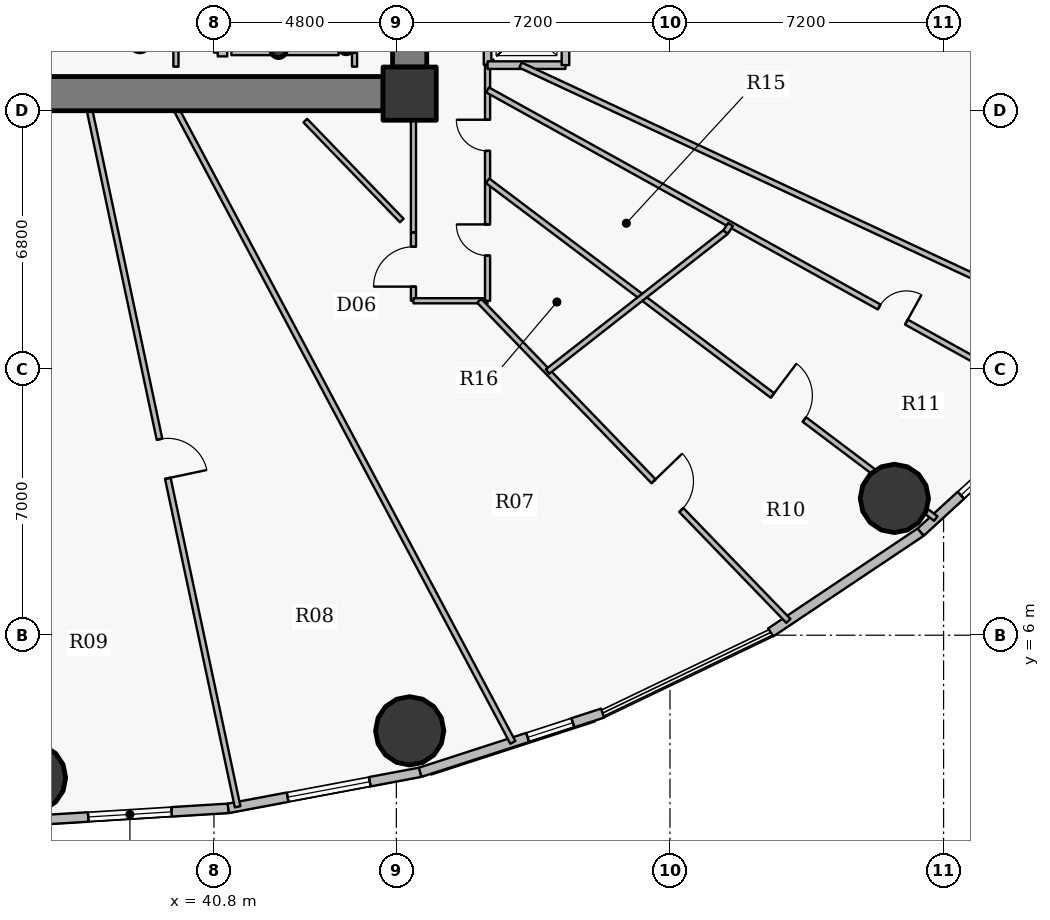
"""IFC4 building model, lengths in metres.
Left out: names, types, materials, properties, quantities, classifications, styles, units other than length and angle.
Written with IfcOpenShell. Run it as: python <this file> out.ifc"""

import sys

from ifc_helpers import new_model, si_unit, direction, frame, frame_2d, origin, origin_2d, place, context, subcontext, project, spatial, rectangle, hollow_circle, extrude, source, transform, mapped, element, fill, save


model = new_model("IFC4")
c1 = context("Model", 3, precision=1e-05, world=origin(), true_north=direction((0.0, 1.0)))
c2 = subcontext(c1, "Body", "Model", "MODEL_VIEW")
j1 = project(units=[si_unit("LENGTHUNIT", "METRE"), si_unit("PLANEANGLEUNIT", "RADIAN")], contexts=[c1])
p1 = place(None, origin())
s1 = spatial("IfcSite", under=j1, at=p1, CompositionType="ELEMENT")
p2 = place(p1, origin())
s2 = spatial("IfcBuilding", under=s1, at=p2, CompositionType="ELEMENT")
p3 = place(p2, frame((0.0, 0.0, 18.6)))
s3 = spatial("IfcBuildingStorey", under=s2, at=p3, CompositionType="ELEMENT", Elevation=18.6)
p4 = place(p3, frame((45.95, 20.25, 0.0), z_axis=(0.0, 0.0, 1.0), x_axis=(1.0, 0.0, 0.0)))
e1 = element("IfcColumn", 1, at=p4, inside=s3, PredefinedType="COLUMN", context=c2, shape_type="SweptSolid", body=[
    extrude(rectangle(XDim=1.4, YDim=1.4, at=origin_2d()), origin(), (0.0, 0.0, 1.0), 4.2),
])
p5 = place(p3, frame((38.85, 21.6, 0.0), z_axis=(0.0, 0.0, 1.0), x_axis=(1.0, 0.0, 0.0)))
e2 = element("IfcColumn", 2, at=p5, inside=s3, PredefinedType="COLUMN", context=c2, shape_type="SweptSolid", body=[
    extrude(hollow_circle(Radius=0.254, WallThickness=0.02, at=origin_2d()), origin(), (0.0, 0.0, 1.0), 4.2),
])
for number, where, z_axis, x_axis in (
    (3, (44.28, 21.5, 0.0), (0.0, 0.0, 1.0), (1.0, 0.0, 0.0)),
    (4, (42.5, 21.4, 0.0), (0.0, 0.0, 1.0), (1.0, 0.0, 0.0)),
):
    element("IfcColumn", number, at=place(p3, frame(where, z_axis=z_axis, x_axis=x_axis)), inside=s3, PredefinedType="COLUMN", context=c2, shape_type="SweptSolid", body=[
        extrude(hollow_circle(Radius=0.203, WallThickness=0.016, at=origin_2d()), origin(), (0.0, 0.0, 1.0), 4.2),
    ])
p6 = place(p3, frame((45.95, 33.05, 0.0), z_axis=(0.0, 0.0, 1.0), x_axis=(0.0, -1.0, 0.0)))
e5 = element("IfcWall", 5, at=p6, inside=s3, PredefinedType="SHEAR", context=c2, shape_type="SweptSolid", body=[
    extrude(rectangle(XDim=12.1, YDim=0.9, at=frame_2d((6.05, 0.0))), origin(), (0.0, 0.0, 1.0), 3.35),
])
p7 = place(p6, frame((5.64, 0.0, 0.0)))
e6 = element("IfcOpeningElement", 6, at=p7, cuts=e5, PredefinedType="OPENING", context=c2, shape_type="SweptSolid", body=[
    extrude(rectangle(XDim=0.82, YDim=2.1, at=origin_2d()), frame((0.41, 0.46, 1.05), z_axis=(0.0, -1.0, 0.0), x_axis=(1.0, 0.0, 0.0)), (0.0, 0.0, 1.0), 0.92),
])
p8 = place(p3, frame((45.25, 20.25, 0.0), z_axis=(0.0, 0.0, 1.0), x_axis=(-1.0, 0.0, 0.0)))
e7 = element("IfcWall", 7, at=p8, inside=s3, PredefinedType="SHEAR", context=c2, shape_type="SweptSolid", body=[
    extrude(rectangle(XDim=18.5, YDim=0.9, at=frame_2d((9.25, 0.0))), origin(), (0.0, 0.0, 1.0), 3.35),
])
p9 = place(p8, frame((10.0, 0.0, 0.0)))
e8 = element("IfcOpeningElement", 8, at=p9, cuts=e7, PredefinedType="OPENING", context=c2, shape_type="SweptSolid", body=[
    extrude(rectangle(XDim=1.15, YDim=2.15, at=origin_2d()), frame((0.575, 0.46, 1.075), z_axis=(0.0, -1.0, 0.0), x_axis=(1.0, 0.0, 0.0)), (0.0, 0.0, 1.0), 0.92),
])
for number, where, z_axis, x_axis in (
    (9, (36.0, 2.25, 0.0), (0.0, 0.0, 1.0), (1.0, 0.0, 0.0)),
    (10, (45.951, 3.484, 0.0), (0.0, 0.0, 1.0), (1.0, 0.0, 0.0)),
    (11, (58.705, 9.599, 0.0), (0.0, 0.0, 1.0), (1.0, 0.0, 0.0)),
):
    element("IfcColumn", number, at=place(p3, frame(where, z_axis=z_axis, x_axis=x_axis)), inside=s3, PredefinedType="COLUMN", context=c2, shape_type="SweptSolid", body=[
        extrude(hollow_circle(Radius=0.9, WallThickness=0.05, at=origin_2d()), origin(), (0.0, 0.0, 1.0), 4.2),
    ])
p10 = place(p3, frame((41.178, 1.444, 0.0), z_axis=(0.0, 0.0, 1.0), x_axis=(-0.998106762298, -0.061505211614, 0.0)))
e12 = element("IfcWall", 12, at=p10, inside=s3, PredefinedType="SOLIDWALL", context=c2, shape_type="SweptSolid", body=[
    extrude(rectangle(XDim=5.188, YDim=0.25, at=frame_2d((2.594, 0.0))), origin(), (0.0, 0.0, 1.0), 3.9),
])
p11 = place(p10, frame((1.494, 0.0, 0.9)))
e13 = element("IfcOpeningElement", 13, at=p11, cuts=e12, PredefinedType="OPENING", context=c2, shape_type="SweptSolid", body=[
    extrude(rectangle(XDim=2.2, YDim=2.0, at=origin_2d()), frame((1.1, 0.135, 1.0), z_axis=(0.0, -1.0, 0.0), x_axis=(1.0, 0.0, 0.0)), (0.0, 0.0, 1.0), 0.27),
])
p12 = place(p3, frame((46.229, 2.394, 0.0), z_axis=(0.0, 0.0, 1.0), x_axis=(-0.98278278947, -0.184764684726, 0.0)))
e14 = element("IfcWall", 14, at=p12, inside=s3, PredefinedType="SOLIDWALL", context=c2, shape_type="SweptSolid", body=[
    extrude(rectangle(XDim=5.139, YDim=0.25, at=frame_2d((2.569, 0.0))), origin(), (0.0, 0.0, 1.0), 3.9),
])
p13 = place(p12, frame((1.351, 0.0, 0.9)))
e15 = element("IfcOpeningElement", 15, at=p13, cuts=e14, PredefinedType="OPENING", context=c2, shape_type="SweptSolid", body=[
    extrude(rectangle(XDim=2.2, YDim=2.0, at=origin_2d()), frame((1.1, 0.135, 1.0), z_axis=(0.0, -1.0, 0.0), x_axis=(1.0, 0.0, 0.0)), (0.0, 0.0, 1.0), 0.27),
])
p14 = place(p3, frame((51.026, 3.95, 0.0), z_axis=(0.0, 0.0, 1.0), x_axis=(-0.951198629726, -0.308579271513, 0.0)))
e16 = element("IfcWall", 16, at=p14, inside=s3, PredefinedType="SOLIDWALL", context=c2, shape_type="SweptSolid", body=[
    extrude(rectangle(XDim=5.044, YDim=0.25, at=frame_2d((2.522, 0.0))), origin(), (0.0, 0.0, 1.0), 3.9),
])
p15 = place(p14, frame((0.822, 0.0, 0.9)))
e17 = element("IfcOpeningElement", 17, at=p15, cuts=e16, PredefinedType="OPENING", context=c2, shape_type="SweptSolid", body=[
    extrude(rectangle(XDim=1.25, YDim=1.65, at=origin_2d()), frame((0.625, 0.135, 0.825), z_axis=(0.0, -1.0, 0.0), x_axis=(1.0, 0.0, 0.0)), (0.0, 0.0, 1.0), 0.27),
])
p16 = place(p3, frame((59.399, 8.714, 0.0), z_axis=(0.0, 0.0, 1.0), x_axis=(-0.831218664812, -0.555945618985, 0.0)))
e18 = element("IfcWall", 18, at=p16, inside=s3, PredefinedType="SOLIDWALL", context=c2, shape_type="SweptSolid", body=[
    extrude(rectangle(XDim=4.748, YDim=0.25, at=frame_2d((2.374, 0.0))), origin(), (0.0, 0.0, 1.0), 3.9),
])
p17 = place(p3, frame((62.768, 11.802, 0.0), z_axis=(0.0, 0.0, 1.0), x_axis=(-0.737076532105, -0.675809282136, 0.0)))
e19 = element("IfcWall", 19, at=p17, inside=s3, PredefinedType="SOLIDWALL", context=c2, shape_type="SweptSolid", body=[
    extrude(rectangle(XDim=4.571, YDim=0.25, at=frame_2d((2.285, 0.0))), origin(), (0.0, 0.0, 1.0), 3.9),
])
p18 = place(p17, frame((0.936, 0.0, 0.9)))
e20 = element("IfcOpeningElement", 20, at=p18, cuts=e19, PredefinedType="OPENING", context=c2, shape_type="SweptSolid", body=[
    extrude(rectangle(XDim=2.2, YDim=2.0, at=origin_2d()), frame((1.1, 0.135, 1.0), z_axis=(0.0, -1.0, 0.0), x_axis=(1.0, 0.0, 0.0)), (0.0, 0.0, 1.0), 0.27),
])
p19 = place(p3, frame((37.531, 19.8, 0.0), z_axis=(0.0, 0.0, 1.0), x_axis=(0.207904603096, -0.978149107249, 0.0)))
e21 = element("IfcWall", 21, at=p19, inside=s3, PredefinedType="PARTITIONING", context=c2, shape_type="SweptSolid", body=[
    extrude(rectangle(XDim=18.724, YDim=0.15, at=frame_2d((9.362, 0.0))), origin(), (0.0, 0.0, 1.0), 3.285),
])
p20 = place(p19, frame((8.837, 0.0, 0.0)))
e22 = element("IfcOpeningElement", 22, at=p20, cuts=e21, PredefinedType="OPENING", context=c2, shape_type="SweptSolid", body=[
    extrude(rectangle(XDim=1.05, YDim=2.15, at=origin_2d()), frame((0.525, 0.085, 1.075), z_axis=(0.0, -1.0, 0.0), x_axis=(1.0, 0.0, 0.0)), (0.0, 0.0, 1.0), 0.17),
])
p21 = place(p3, frame((39.828, 19.8, 0.0), z_axis=(0.0, 0.0, 1.0), x_axis=(0.469463695446, -0.882951775953, 0.0)))
e23 = element("IfcWall", 23, at=p21, inside=s3, PredefinedType="PARTITIONING", context=c2, shape_type="SweptSolid", body=[
    extrude(rectangle(XDim=18.824, YDim=0.15, at=frame_2d((9.412, 0.0))), origin(), (0.0, 0.0, 1.0), 3.285),
])
p22 = place(p3, frame((40.9, 21.33, 0.0), z_axis=(0.0, 0.0, 1.0), x_axis=(0.0, 1.0, 0.0)))
e24 = element("IfcWall", 24, at=p22, inside=s3, PredefinedType="PARTITIONING", context=c2, shape_type="SweptSolid", body=[
    extrude(rectangle(XDim=5.91, YDim=0.2, at=frame_2d((2.955, 0.0))), origin(), (0.0, 0.0, 1.0), 3.435),
])
p23 = place(p3, frame((40.9, 21.33, 0.0), z_axis=(0.0, 0.0, 1.0), x_axis=(1.0, 0.0, 0.0)))
e25 = element("IfcWall", 25, at=p23, inside=s3, PredefinedType="PARTITIONING", context=c2, shape_type="SweptSolid", body=[
    extrude(rectangle(XDim=0.25, YDim=0.2, at=frame_2d((0.125, 0.0))), origin(), (0.0, 0.0, 1.0), 3.435),
])
p24 = place(p3, frame((44.44, 21.33, 0.0), z_axis=(0.0, 0.0, 1.0), x_axis=(0.0, 1.0, 0.0)))
e26 = element("IfcWall", 26, at=p24, inside=s3, PredefinedType="PARTITIONING", context=c2, shape_type="SweptSolid", body=[
    extrude(rectangle(XDim=8.52, YDim=0.2, at=frame_2d((4.26, 0.0))), origin(), (0.0, 0.0, 1.0), 3.9),
])
p25 = place(p3, frame((46.05, 14.8, 0.0), z_axis=(0.0, 0.0, 1.0), x_axis=(0.0, 1.0, 0.0)))
e27 = element("IfcWall", 27, at=p25, inside=s3, PredefinedType="PARTITIONING", context=c2, shape_type="SweptSolid", body=[
    extrude(rectangle(XDim=1.793, YDim=0.135, at=frame_2d((0.896, 0.0))), origin(), (0.0, 0.0, 1.0), 3.9),
])
p26 = place(p25, frame((0.372, 0.0, 0.0)))
e28 = element("IfcOpeningElement", 28, at=p26, cuts=e27, PredefinedType="OPENING", context=c2, shape_type="SweptSolid", body=[
    extrude(rectangle(XDim=1.05, YDim=2.15, at=origin_2d()), frame((0.525, 0.078, 1.075), z_axis=(0.0, -1.0, 0.0), x_axis=(1.0, 0.0, 0.0)), (0.0, 0.0, 1.0), 0.155),
])
p27 = place(p3, frame((46.05, 14.8, 0.0), z_axis=(0.0, 0.0, 1.0), x_axis=(1.0, 0.0, 0.0)))
e29 = element("IfcWall", 29, at=p27, inside=s3, PredefinedType="PARTITIONING", context=c2, shape_type="SweptSolid", body=[
    extrude(rectangle(XDim=1.95, YDim=0.135, at=frame_2d((0.975, 0.0))), origin(), (0.0, 0.0, 1.0), 3.9),
])
p28 = place(p3, frame((47.781, 14.8, 0.0), z_axis=(0.0, 0.0, 1.0), x_axis=(0.694655165544, -0.719342895275, 0.0)))
e30 = element("IfcWall", 30, at=p28, inside=s3, PredefinedType="PARTITIONING", context=c2, shape_type="SweptSolid", body=[
    extrude(rectangle(XDim=11.709, YDim=0.15, at=frame_2d((5.854, 0.0))), origin(), (0.0, 0.0, 1.0), 3.285),
])
p29 = place(p28, frame((6.603, 0.0, 0.0)))
e31 = element("IfcOpeningElement", 31, at=p29, cuts=e30, PredefinedType="OPENING", context=c2, shape_type="SweptSolid", body=[
    extrude(rectangle(XDim=1.05, YDim=2.15, at=origin_2d()), frame((0.525, 0.085, 1.075), z_axis=(0.0, -1.0, 0.0), x_axis=(1.0, 0.0, 0.0)), (0.0, 0.0, 1.0), 0.17),
])
p30 = place(p3, frame((48.0, 14.8, 0.0), z_axis=(0.0, 0.0, 1.0), x_axis=(0.0, 1.0, 0.0)))
e32 = element("IfcWall", 32, at=p30, inside=s3, PredefinedType="PARTITIONING", context=c2, shape_type="SweptSolid", body=[
    extrude(rectangle(XDim=6.2, YDim=0.135, at=frame_2d((3.1, 0.0))), origin(), (0.0, 0.0, 1.0), 3.085),
])
p31 = place(p30, frame((1.189, 0.0, 0.0)))
e33 = element("IfcOpeningElement", 33, at=p31, cuts=e32, PredefinedType="OPENING", context=c2, shape_type="SweptSolid", body=[
    extrude(rectangle(XDim=0.82, YDim=2.1, at=origin_2d()), frame((0.41, 0.078, 1.05), z_axis=(0.0, -1.0, 0.0), x_axis=(1.0, 0.0, 0.0)), (0.0, 0.0, 1.0), 0.155),
])
p32 = place(p30, frame((3.943, 0.0, 0.0)))
e34 = element("IfcOpeningElement", 34, at=p32, cuts=e32, PredefinedType="OPENING", context=c2, shape_type="SweptSolid", body=[
    extrude(rectangle(XDim=0.82, YDim=2.1, at=origin_2d()), frame((0.41, 0.078, 1.05), z_axis=(0.0, -1.0, 0.0), x_axis=(1.0, 0.0, 0.0)), (0.0, 0.0, 1.0), 0.155),
])
p33 = place(p3, frame((48.0, 17.957, 0.0), z_axis=(0.0, 0.0, 1.0), x_axis=(0.798637068648, -0.601812954814, 0.0)))
e35 = element("IfcWall", 35, at=p33, inside=s3, PredefinedType="PARTITIONING", context=c2, shape_type="SweptSolid", body=[
    extrude(rectangle(XDim=14.768, YDim=0.15, at=frame_2d((7.384, 0.0))), origin(), (0.0, 0.0, 1.0), 3.085),
])
p34 = place(p33, frame((9.388, 0.0, 0.0)))
e36 = element("IfcOpeningElement", 36, at=p34, cuts=e35, PredefinedType="OPENING", context=c2, shape_type="SweptSolid", body=[
    extrude(rectangle(XDim=1.05, YDim=2.15, at=origin_2d()), frame((0.525, 0.085, 1.075), z_axis=(0.0, -1.0, 0.0), x_axis=(1.0, 0.0, 0.0)), (0.0, 0.0, 1.0), 0.17),
])
p35 = place(p3, frame((48.0, 20.348, 0.0), z_axis=(0.0, 0.0, 1.0), x_axis=(0.874615123646, -0.484817888996, 0.0)))
e37 = element("IfcWall", 37, at=p35, inside=s3, PredefinedType="PARTITIONING", context=c2, shape_type="SweptSolid", body=[
    extrude(rectangle(XDim=17.115, YDim=0.15, at=frame_2d((8.557, 0.0))), origin(), (0.0, 0.0, 1.0), 3.285),
])
p36 = place(p35, frame((11.781, 0.0, 0.0)))
e38 = element("IfcOpeningElement", 38, at=p36, cuts=e37, PredefinedType="OPENING", context=c2, shape_type="SweptSolid", body=[
    extrude(rectangle(XDim=0.82, YDim=2.1, at=origin_2d()), frame((0.41, 0.085, 1.05), z_axis=(0.0, -1.0, 0.0), x_axis=(1.0, 0.0, 0.0)), (0.0, 0.0, 1.0), 0.17),
])
p37 = place(p3, frame((48.0, 21.01, 0.0), z_axis=(0.0, 0.0, 1.0), x_axis=(0.0, 1.0, 0.0)))
e39 = element("IfcWall", 39, at=p37, inside=s3, PredefinedType="PARTITIONING", context=c2, shape_type="SweptSolid", body=[
    extrude(rectangle(XDim=5.41, YDim=0.2, at=frame_2d((2.705, 0.0))), origin(), (0.0, 0.0, 1.0), 3.085),
])
p38 = place(p37, frame((3.02, 0.0, 0.0)))
e40 = element("IfcOpeningElement", 40, at=p38, cuts=e39, PredefinedType="OPENING", context=c2, shape_type="SweptSolid", body=[
    extrude(rectangle(XDim=1.2, YDim=2.15, at=origin_2d()), frame((0.6, 0.11, 1.075), z_axis=(0.0, -1.0, 0.0), x_axis=(1.0, 0.0, 0.0)), (0.0, 0.0, 1.0), 0.22),
])
p39 = place(p37, frame((0.465, 0.0, 0.0)))
e41 = element("IfcOpeningElement", 41, at=p39, cuts=e39, PredefinedType="OPENING", context=c2, shape_type="SweptSolid", body=[
    extrude(rectangle(XDim=1.05, YDim=2.15, at=origin_2d()), frame((0.525, 0.11, 1.075), z_axis=(0.0, -1.0, 0.0), x_axis=(1.0, 0.0, 0.0)), (0.0, 0.0, 1.0), 0.22),
])
p40 = place(p3, frame((48.0, 21.0, 0.0), z_axis=(0.0, 0.0, 1.0), x_axis=(1.0, 0.0, 0.0)))
e42 = element("IfcWall", 42, at=p40, inside=s3, PredefinedType="PARTITIONING", context=c2, shape_type="SweptSolid", body=[
    extrude(rectangle(XDim=2.05, YDim=0.2, at=frame_2d((1.025, 0.0))), origin(), (0.0, 0.0, 1.0), 3.9),
])
p41 = place(p3, frame((48.867, 21.0, 0.0), z_axis=(0.0, 0.0, 1.0), x_axis=(0.906305939421, -0.422622223942, 0.0)))
e43 = element("IfcWall", 43, at=p41, inside=s3, PredefinedType="PARTITIONING", context=c2, shape_type="SweptSolid", body=[
    extrude(rectangle(XDim=17.061, YDim=0.15, at=frame_2d((8.53, 0.0))), origin(), (0.0, 0.0, 1.0), 3.285),
])
p42 = place(p3, frame((49.579, 12.939, 0.0), z_axis=(0.0, 0.0, 1.0), x_axis=(0.787322308609, 0.616541630684, 0.0)))
e44 = element("IfcWall", 44, at=p42, inside=s3, PredefinedType="PARTITIONING", context=c2, shape_type="SweptSolid", body=[
    extrude(rectangle(XDim=5.951, YDim=0.15, at=frame_2d((2.976, 0.0))), origin(), (0.0, 0.0, 1.0), 3.085),
])
p43 = place(p3, frame((50.05, 21.0, 0.0), z_axis=(0.0, 0.0, 1.0), x_axis=(0.0, 1.0, 0.0)))
e45 = element("IfcWall", 45, at=p43, inside=s3, PredefinedType="PARTITIONING", context=c2, shape_type="SweptSolid", body=[
    extrude(rectangle(XDim=1.88, YDim=0.2, at=frame_2d((0.94, 0.0))), origin(), (0.0, 0.0, 1.0), 3.085),
])
p44 = place(p3, frame((54.264, 16.608, 0.0), z_axis=(0.0, 0.0, 1.0), x_axis=(0.545316895374, 0.838229970604, 0.0)))
e46 = element("IfcWall", 46, at=p44, inside=s3, PredefinedType="PARTITIONING", context=c2, shape_type="SweptSolid", body=[
    extrude(rectangle(XDim=0.235, YDim=0.15, at=frame_2d((0.118, 0.0))), origin(), (0.0, 0.0, 1.0), 3.9),
])
p45 = place(p3, frame((44.08, 21.33, 0.0), z_axis=(0.0, 0.0, 1.0), x_axis=(-1.0, 0.0, 0.0)))
e47 = element("IfcWall", 47, at=p45, inside=s3, PredefinedType="PARTITIONING", context=c2, shape_type="SweptSolid", body=[
    extrude(rectangle(XDim=2.82, YDim=0.135, at=frame_2d((1.41, 0.0))), origin(), (0.0, 0.0, 1.0), 3.435),
])
p46 = place(p3, frame((39.8, 20.96, 0.0), z_axis=(0.0, 0.0, 1.0), x_axis=(0.0, 1.0, 0.0)))
e48 = element("IfcWall", 48, at=p46, inside=s3, PredefinedType="PARTITIONING", context=c2, shape_type="SweptSolid", body=[
    extrude(rectangle(XDim=0.58, YDim=0.135, at=frame_2d((0.29, 0.0))), origin(), (0.0, 0.0, 1.0), 3.435),
])
p47 = place(p3, frame((44.5, 20.96, 0.0), z_axis=(0.0, 0.0, 1.0), x_axis=(0.0, 1.0, 0.0)))
e49 = element("IfcWall", 49, at=p47, inside=s3, PredefinedType="PARTITIONING", context=c2, shape_type="SweptSolid", body=[
    extrude(rectangle(XDim=0.36, YDim=0.135, at=frame_2d((0.18, 0.0))), origin(), (0.0, 0.0, 1.0), 3.9),
])
p48 = place(p3, frame((46.05, 16.603, 0.0), z_axis=(0.0, 0.0, 1.0), x_axis=(0.0, 1.0, 0.0)))
e50 = element("IfcWall", 50, at=p48, inside=s3, PredefinedType="PARTITIONING", context=c2, shape_type="SweptSolid", body=[
    extrude(rectangle(XDim=3.197, YDim=0.135, at=frame_2d((1.599, 0.0))), origin(), (0.0, 0.0, 1.0), 3.085),
])
p49 = place(p3, frame((46.4, 19.8, 0.0), z_axis=(0.0, 0.0, 1.0), x_axis=(0.0, 1.0, 0.0)))
e51 = element("IfcWall", 51, at=p49, inside=s3, PredefinedType="PARTITIONING", context=c2, shape_type="SweptSolid", body=[
    extrude(rectangle(XDim=1.14, YDim=0.135, at=frame_2d((0.57, 0.0))), origin(), (0.0, 0.0, 1.0), 3.9),
])
p50 = place(p3, frame((43.204, 19.54, 0.0), z_axis=(0.0, 0.0, 1.0), x_axis=(0.694638628507, -0.719358864397, 0.0)))
e52 = element("IfcWall", 52, at=p50, inside=s3, PredefinedType="PARTITIONING", context=c2, shape_type="SweptSolid", body=[
    extrude(rectangle(XDim=3.654, YDim=0.135, at=frame_2d((1.827, 0.0))), origin(), (0.0, 0.0, 1.0), 3.9),
])
m1 = source(origin(), c2, "Body", "SweptSolid", [
    extrude(rectangle(XDim=2.2, YDim=2.0, at=origin_2d()), frame((1.1, 0.03, 1.0), z_axis=(0.0, -1.0, 0.0), x_axis=(1.0, 0.0, 0.0)), (0.0, 0.0, 1.0), 0.06),
])
p51 = place(p11, origin())
e53 = element("IfcWindow", 53, at=p51, inside=s3, PartitioningType="TRIPLE_PANEL_VERTICAL", PredefinedType="WINDOW", context=c2, shape_type="MappedRepresentation", body=[
    mapped(m1, transform((0.0, 0.0, 0.0), x_axis=(1.0, 0.0, 0.0), y_axis=(0.0, 1.0, 0.0), z_axis=(0.0, 0.0, 1.0), scale=1.0)),
])
fill(e13, e53)
p52 = place(p13, origin())
e54 = element("IfcWindow", 54, at=p52, inside=s3, PartitioningType="TRIPLE_PANEL_VERTICAL", PredefinedType="WINDOW", context=c2, shape_type="MappedRepresentation", body=[
    mapped(m1, transform((0.0, 0.0, 0.0), x_axis=(1.0, 0.0, 0.0), y_axis=(0.0, 1.0, 0.0), z_axis=(0.0, 0.0, 1.0), scale=1.0)),
])
fill(e15, e54)
m2 = source(origin(), c2, "Body", "SweptSolid", [
    extrude(rectangle(XDim=1.25, YDim=1.65, at=origin_2d()), frame((0.625, 0.03, 0.825), z_axis=(0.0, -1.0, 0.0), x_axis=(1.0, 0.0, 0.0)), (0.0, 0.0, 1.0), 0.06),
])
p53 = place(p15, origin())
e55 = element("IfcWindow", 55, at=p53, inside=s3, PartitioningType="SINGLE_PANEL", PredefinedType="WINDOW", context=c2, shape_type="MappedRepresentation", body=[
    mapped(m2, transform((0.0, 0.0, 0.0), x_axis=(1.0, 0.0, 0.0), y_axis=(0.0, 1.0, 0.0), z_axis=(0.0, 0.0, 1.0), scale=1.0)),
])
fill(e17, e55)
p54 = place(p18, origin())
e56 = element("IfcWindow", 56, at=p54, inside=s3, PartitioningType="TRIPLE_PANEL_VERTICAL", PredefinedType="WINDOW", context=c2, shape_type="MappedRepresentation", body=[
    mapped(m1, transform((0.0, 0.0, 0.0), x_axis=(1.0, 0.0, 0.0), y_axis=(0.0, 1.0, 0.0), z_axis=(0.0, 0.0, 1.0), scale=1.0)),
])
fill(e20, e56)
m3 = source(origin(), c2, "Body", "SweptSolid", [
    extrude(rectangle(XDim=1.05, YDim=2.15, at=origin_2d()), frame((0.525, 0.025, 1.075), z_axis=(0.0, -1.0, 0.0), x_axis=(1.0, 0.0, 0.0)), (0.0, 0.0, 1.0), 0.05),
])
p55 = place(p20, origin())
e57 = element("IfcDoor", 57, at=p55, inside=s3, OperationType="SINGLE_SWING_RIGHT", PredefinedType="DOOR", context=c2, shape_type="MappedRepresentation", body=[
    mapped(m3, transform((0.0, 0.0, 0.0), x_axis=(1.0, 0.0, 0.0), y_axis=(0.0, 1.0, 0.0), z_axis=(0.0, 0.0, 1.0), scale=1.0)),
])
fill(e22, e57)
p56 = place(p26, origin())
e58 = element("IfcDoor", 58, at=p56, inside=s3, OperationType="SINGLE_SWING_LEFT", PredefinedType="DOOR", context=c2, shape_type="MappedRepresentation", body=[
    mapped(m3, transform((0.0, 0.0, 0.0), x_axis=(1.0, 0.0, 0.0), y_axis=(0.0, 1.0, 0.0), z_axis=(0.0, 0.0, 1.0), scale=1.0)),
])
fill(e28, e58)
m4 = source(origin(), c2, "Body", "SweptSolid", [
    extrude(rectangle(XDim=0.82, YDim=2.1, at=origin_2d()), frame((0.41, 0.025, 1.05), z_axis=(0.0, -1.0, 0.0), x_axis=(1.0, 0.0, 0.0)), (0.0, 0.0, 1.0), 0.05),
])
p57 = place(p31, origin())
e59 = element("IfcDoor", 59, at=p57, inside=s3, OperationType="SINGLE_SWING_RIGHT", PredefinedType="DOOR", context=c2, shape_type="MappedRepresentation", body=[
    mapped(m4, transform((0.0, 0.0, 0.0), x_axis=(1.0, 0.0, 0.0), y_axis=(0.0, 1.0, 0.0), z_axis=(0.0, 0.0, 1.0), scale=1.0)),
])
fill(e33, e59)
p58 = place(p29, origin())
e60 = element("IfcDoor", 60, at=p58, inside=s3, OperationType="SINGLE_SWING_LEFT", PredefinedType="DOOR", context=c2, shape_type="MappedRepresentation", body=[
    mapped(m3, transform((0.0, 0.0, 0.0), x_axis=(1.0, 0.0, 0.0), y_axis=(0.0, 1.0, 0.0), z_axis=(0.0, 0.0, 1.0), scale=1.0)),
])
fill(e31, e60)
p59 = place(p32, origin())
e61 = element("IfcDoor", 61, at=p59, inside=s3, OperationType="SINGLE_SWING_RIGHT", PredefinedType="DOOR", context=c2, shape_type="MappedRepresentation", body=[
    mapped(m4, transform((0.0, 0.0, 0.0), x_axis=(1.0, 0.0, 0.0), y_axis=(0.0, 1.0, 0.0), z_axis=(0.0, 0.0, 1.0), scale=1.0)),
])
fill(e34, e61)
p60 = place(p34, origin())
e62 = element("IfcDoor", 62, at=p60, inside=s3, OperationType="SINGLE_SWING_LEFT", PredefinedType="DOOR", context=c2, shape_type="MappedRepresentation", body=[
    mapped(m3, transform((0.0, 0.0, 0.0), x_axis=(1.0, 0.0, 0.0), y_axis=(0.0, 1.0, 0.0), z_axis=(0.0, 0.0, 1.0), scale=1.0)),
])
fill(e36, e62)
p61 = place(p36, origin())
e63 = element("IfcDoor", 63, at=p61, inside=s3, OperationType="SINGLE_SWING_RIGHT", PredefinedType="DOOR", context=c2, shape_type="MappedRepresentation", body=[
    mapped(m4, transform((0.0, 0.0, 0.0), x_axis=(1.0, 0.0, 0.0), y_axis=(0.0, 1.0, 0.0), z_axis=(0.0, 0.0, 1.0), scale=1.0)),
])
fill(e38, e63)
save(model, sys.argv[1])
